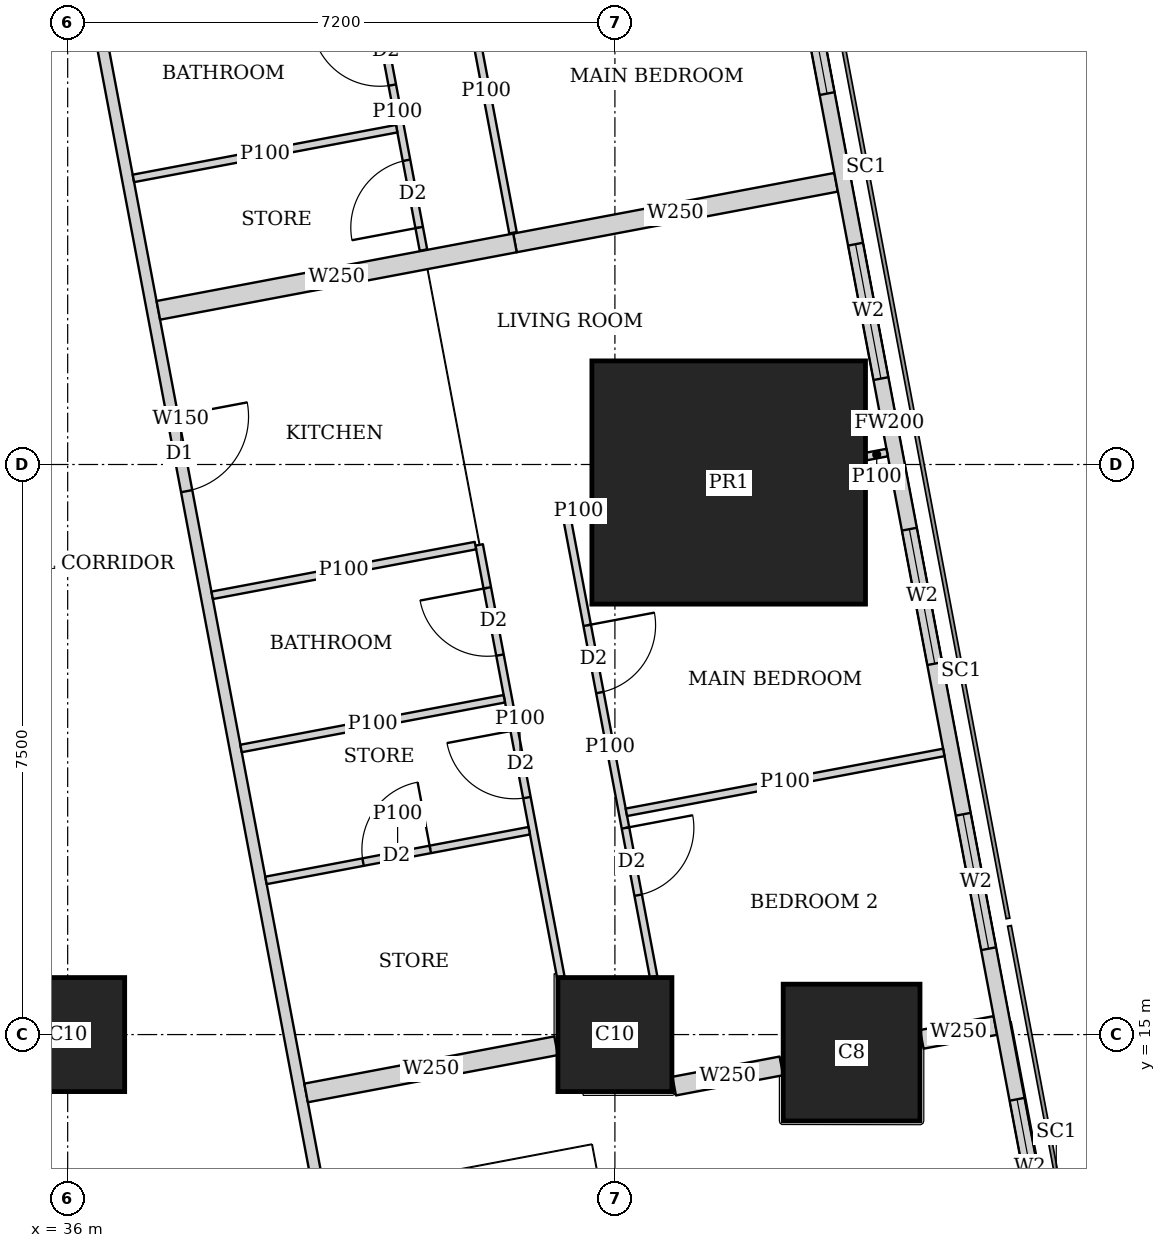
"""IFC4 building model, lengths in metres.
Left out: names, types, materials, properties, quantities, classifications, styles, units other than length and angle.
Written with IfcOpenShell. Run it as: python <this file> out.ifc"""

import sys

from ifc_helpers import new_model, si_unit, direction, frame, frame_2d, origin, origin_2d, place, context, subcontext, project, spatial, rectangle, extrude, element, fill, save


model = new_model("IFC4")
c1 = context("Model", 3, precision=1e-05, world=origin(), true_north=direction((0.0, 1.0)))
c2 = subcontext(c1, "Body", "Model", "MODEL_VIEW")
j1 = project(units=[si_unit("LENGTHUNIT", "METRE"), si_unit("PLANEANGLEUNIT", "RADIAN")], contexts=[c1])
p1 = place(None, origin())
s1 = spatial("IfcSite", under=j1, at=p1, CompositionType="ELEMENT")
p2 = place(p1, origin())
s2 = spatial("IfcBuilding", under=s1, at=p2, CompositionType="ELEMENT")
p3 = place(p2, frame((0.0, 0.0, 180.8)))
s3 = spatial("IfcBuildingStorey", under=s2, at=p3, CompositionType="ELEMENT", Elevation=180.8)
for number, where, z_axis, x_axis in (
    (1, (36.0, 15.0, 0.0), (0.0, 0.0, 1.0), (1.0, 0.0, 0.0)),
    (2, (43.2, 15.0, 0.0), (0.0, 0.0, 1.0), (1.0, 0.0, 0.0)),
):
    element("IfcColumn", number, at=place(p3, frame(where, z_axis=z_axis, x_axis=x_axis)), inside=s3, PredefinedType="COLUMN", context=c2, shape_type="SweptSolid", body=[
        extrude(rectangle(XDim=1.5, YDim=1.5, at=origin_2d()), origin(), (0.0, 0.0, 1.0), 3.75),
    ])
p4 = place(p3, frame((46.314, 14.763, 0.0), z_axis=(0.0, 0.0, 1.0), x_axis=(1.0, 0.0, 0.0)))
e3 = element("IfcColumn", 3, at=p4, inside=s3, PredefinedType="COLUMN", context=c2, shape_type="SweptSolid", body=[
    extrude(rectangle(XDim=1.8, YDim=1.8, at=origin_2d()), origin(), (0.0, 0.0, 1.0), 3.75),
])
p5 = place(p3, frame((44.697, 22.263, 0.0), z_axis=(0.0, 0.0, 1.0), x_axis=(1.0, 0.0, 0.0)))
e4 = element("IfcColumn", 4, at=p5, inside=s3, PredefinedType="COLUMN", context=c2, shape_type="SweptSolid", body=[
    extrude(rectangle(XDim=3.6, YDim=3.2, at=origin_2d()), origin(), (0.0, 0.0, 1.0), 3.75),
])
p6 = place(p3, frame((50.653, 2.703, 0.0), z_axis=(0.0, 0.0, 1.0), x_axis=(-0.185612026696, 0.982623109613, 0.0)))
e5 = element("IfcWall", 5, at=p6, inside=s3, PredefinedType="SOLIDWALL", context=c2, shape_type="SweptSolid", body=[
    extrude(rectangle(XDim=41.393, YDim=0.2, at=frame_2d((20.697, 0.0))), origin(), (0.0, 0.0, 1.0), 3.5),
])
p7 = place(p6, frame((1.633, 0.0, 0.9)))
e6 = element("IfcOpeningElement", 6, at=p7, cuts=e5, PredefinedType="OPENING", context=c2, shape_type="SweptSolid", body=[
    extrude(rectangle(XDim=1.8, YDim=1.5, at=frame_2d((0.9, 0.75))), frame((0.0, 0.11, 0.0), z_axis=(0.0, -1.0, 0.0), x_axis=(1.0, 0.0, 0.0)), (0.0, 0.0, 1.0), 0.22),
])
p8 = place(p6, frame((6.032, 0.0, 0.9)))
e7 = element("IfcOpeningElement", 7, at=p8, cuts=e5, PredefinedType="OPENING", context=c2, shape_type="SweptSolid", body=[
    extrude(rectangle(XDim=1.8, YDim=1.5, at=frame_2d((0.9, 0.75))), frame((0.0, 0.11, 0.0), z_axis=(0.0, -1.0, 0.0), x_axis=(1.0, 0.0, 0.0)), (0.0, 0.0, 1.0), 0.22),
])
p9 = place(p6, frame((9.848, 0.0, 0.9)))
e8 = element("IfcOpeningElement", 8, at=p9, cuts=e5, PredefinedType="OPENING", context=c2, shape_type="SweptSolid", body=[
    extrude(rectangle(XDim=1.8, YDim=1.5, at=frame_2d((0.9, 0.75))), frame((0.0, 0.11, 0.0), z_axis=(0.0, -1.0, 0.0), x_axis=(1.0, 0.0, 0.0)), (0.0, 0.0, 1.0), 0.22),
])
p10 = place(p6, frame((13.664, 0.0, 0.9)))
e9 = element("IfcOpeningElement", 9, at=p10, cuts=e5, PredefinedType="OPENING", context=c2, shape_type="SweptSolid", body=[
    extrude(rectangle(XDim=1.8, YDim=1.5, at=frame_2d((0.9, 0.75))), frame((0.0, 0.11, 0.0), z_axis=(0.0, -1.0, 0.0), x_axis=(1.0, 0.0, 0.0)), (0.0, 0.0, 1.0), 0.22),
])
p11 = place(p6, frame((17.481, 0.0, 0.9)))
e10 = element("IfcOpeningElement", 10, at=p11, cuts=e5, PredefinedType="OPENING", context=c2, shape_type="SweptSolid", body=[
    extrude(rectangle(XDim=1.8, YDim=1.5, at=frame_2d((0.9, 0.75))), frame((0.0, 0.11, 0.0), z_axis=(0.0, -1.0, 0.0), x_axis=(1.0, 0.0, 0.0)), (0.0, 0.0, 1.0), 0.22),
])
p12 = place(p6, frame((21.297, 0.0, 0.9)))
e11 = element("IfcOpeningElement", 11, at=p12, cuts=e5, PredefinedType="OPENING", context=c2, shape_type="SweptSolid", body=[
    extrude(rectangle(XDim=1.8, YDim=1.5, at=frame_2d((0.9, 0.75))), frame((0.0, 0.11, 0.0), z_axis=(0.0, -1.0, 0.0), x_axis=(1.0, 0.0, 0.0)), (0.0, 0.0, 1.0), 0.22),
])
p13 = place(p6, frame((25.113, 0.0, 0.9)))
e12 = element("IfcOpeningElement", 12, at=p13, cuts=e5, PredefinedType="OPENING", context=c2, shape_type="SweptSolid", body=[
    extrude(rectangle(XDim=1.8, YDim=1.5, at=frame_2d((0.9, 0.75))), frame((0.0, 0.11, 0.0), z_axis=(0.0, -1.0, 0.0), x_axis=(1.0, 0.0, 0.0)), (0.0, 0.0, 1.0), 0.22),
])
p14 = place(p6, frame((28.93, 0.0, 0.9)))
e13 = element("IfcOpeningElement", 13, at=p14, cuts=e5, PredefinedType="OPENING", context=c2, shape_type="SweptSolid", body=[
    extrude(rectangle(XDim=1.8, YDim=1.5, at=frame_2d((0.9, 0.75))), frame((0.0, 0.11, 0.0), z_axis=(0.0, -1.0, 0.0), x_axis=(1.0, 0.0, 0.0)), (0.0, 0.0, 1.0), 0.22),
])
p15 = place(p6, frame((32.746, 0.0, 0.9)))
e14 = element("IfcOpeningElement", 14, at=p15, cuts=e5, PredefinedType="OPENING", context=c2, shape_type="SweptSolid", body=[
    extrude(rectangle(XDim=1.8, YDim=1.5, at=frame_2d((0.9, 0.75))), frame((0.0, 0.11, 0.0), z_axis=(0.0, -1.0, 0.0), x_axis=(1.0, 0.0, 0.0)), (0.0, 0.0, 1.0), 0.22),
])
p16 = place(p6, frame((36.481, 0.0, 0.9)))
e15 = element("IfcOpeningElement", 15, at=p16, cuts=e5, PredefinedType="OPENING", context=c2, shape_type="SweptSolid", body=[
    extrude(rectangle(XDim=1.8, YDim=1.5, at=frame_2d((0.9, 0.75))), frame((0.0, 0.11, 0.0), z_axis=(0.0, -1.0, 0.0), x_axis=(1.0, 0.0, 0.0)), (0.0, 0.0, 1.0), 0.22),
])
p17 = place(p3, frame((33.623, 43.022, 0.0), z_axis=(0.0, 0.0, 1.0), x_axis=(0.185596841028, -0.98262597798, 0.0)))
e16 = element("IfcWall", 16, at=p17, inside=s3, PredefinedType="SOLIDWALL", context=c2, shape_type="SweptSolid", body=[
    extrude(rectangle(XDim=41.66, YDim=0.15, at=frame_2d((20.83, 0.0))), origin(), (0.0, 0.0, 1.0), 2.5),
])
p18 = place(p17, frame((8.034, 0.0, 0.0)))
e17 = element("IfcOpeningElement", 17, at=p18, cuts=e16, PredefinedType="OPENING", context=c2, shape_type="SweptSolid", body=[
    extrude(rectangle(XDim=1.0, YDim=2.1, at=frame_2d((0.5, 1.05))), frame((0.0, 0.085, 0.0), z_axis=(0.0, -1.0, 0.0), x_axis=(1.0, 0.0, 0.0)), (0.0, 0.0, 1.0), 0.17),
])
p19 = place(p17, frame((12.611, 0.0, 0.0)))
e18 = element("IfcOpeningElement", 18, at=p19, cuts=e16, PredefinedType="OPENING", context=c2, shape_type="SweptSolid", body=[
    extrude(rectangle(XDim=1.0, YDim=2.1, at=frame_2d((0.5, 1.05))), frame((0.0, 0.085, 0.0), z_axis=(0.0, -1.0, 0.0), x_axis=(1.0, 0.0, 0.0)), (0.0, 0.0, 1.0), 0.17),
])
p20 = place(p17, frame((20.242, 0.0, 0.0)))
e19 = element("IfcOpeningElement", 19, at=p20, cuts=e16, PredefinedType="OPENING", context=c2, shape_type="SweptSolid", body=[
    extrude(rectangle(XDim=1.0, YDim=2.1, at=frame_2d((0.5, 1.05))), frame((0.0, 0.085, 0.0), z_axis=(0.0, -1.0, 0.0), x_axis=(1.0, 0.0, 0.0)), (0.0, 0.0, 1.0), 0.17),
])
p21 = place(p17, frame((31.206, 0.0, 0.0)))
e20 = element("IfcOpeningElement", 20, at=p21, cuts=e16, PredefinedType="OPENING", context=c2, shape_type="SweptSolid", body=[
    extrude(rectangle(XDim=1.0, YDim=2.1, at=frame_2d((0.5, 1.05))), frame((0.0, 0.085, 0.0), z_axis=(0.0, -1.0, 0.0), x_axis=(1.0, 0.0, 0.0)), (0.0, 0.0, 1.0), 0.17),
])
p22 = place(p3, frame((41.156, 29.273, 0.0), z_axis=(0.0, 0.0, 1.0), x_axis=(0.185474762472, -0.982649028131, 0.0)))
e21 = element("IfcWall", 21, at=p22, inside=s3, PredefinedType="PARTITIONING", context=c2, shape_type="SweptSolid", body=[
    extrude(rectangle(XDim=3.79, YDim=0.1, at=frame_2d((1.895, 0.0))), origin(), (0.0, 0.0, 1.0), 2.5),
])
p23 = place(p22, frame((0.31, 0.0, 0.0)))
e22 = element("IfcOpeningElement", 22, at=p23, cuts=e21, PredefinedType="OPENING", context=c2, shape_type="SweptSolid", body=[
    extrude(rectangle(XDim=0.9, YDim=2.1, at=frame_2d((0.45, 1.05))), frame((0.0, 0.06, 0.0), z_axis=(0.0, -1.0, 0.0), x_axis=(1.0, 0.0, 0.0)), (0.0, 0.0, 1.0), 0.12),
])
p24 = place(p3, frame((39.997, 28.942, 0.0), z_axis=(0.0, 0.0, 1.0), x_axis=(0.185580474845, -0.982629069057, 0.0)))
e23 = element("IfcWall", 23, at=p24, inside=s3, PredefinedType="PARTITIONING", context=c2, shape_type="SweptSolid", body=[
    extrude(rectangle(XDim=3.685, YDim=0.1, at=frame_2d((1.842, 0.0))), origin(), (0.0, 0.0, 1.0), 3.5),
])
p25 = place(p24, frame((0.576, 0.0, 0.0)))
e24 = element("IfcOpeningElement", 24, at=p25, cuts=e23, PredefinedType="OPENING", context=c2, shape_type="SweptSolid", body=[
    extrude(rectangle(XDim=0.9, YDim=2.1, at=frame_2d((0.45, 1.05))), frame((0.0, 0.06, 0.0), z_axis=(0.0, -1.0, 0.0), x_axis=(1.0, 0.0, 0.0)), (0.0, 0.0, 1.0), 0.12),
])
p26 = place(p24, frame((2.483, 0.0, 0.0)))
e25 = element("IfcOpeningElement", 25, at=p26, cuts=e23, PredefinedType="OPENING", context=c2, shape_type="SweptSolid", body=[
    extrude(rectangle(XDim=0.9, YDim=2.1, at=frame_2d((0.45, 1.05))), frame((0.0, 0.06, 0.0), z_axis=(0.0, -1.0, 0.0), x_axis=(1.0, 0.0, 0.0)), (0.0, 0.0, 1.0), 0.12),
])
p27 = place(p3, frame((40.329, 26.918, 0.0), z_axis=(0.0, 0.0, 1.0), x_axis=(-0.982638553676, -0.185530247748, 0.0)))
e26 = element("IfcWall", 26, at=p27, inside=s3, PredefinedType="PARTITIONING", context=c2, shape_type="SweptSolid", body=[
    extrude(rectangle(XDim=3.525, YDim=0.1, at=frame_2d((1.763, 0.0))), origin(), (0.0, 0.0, 1.0), 3.5),
])
p28 = place(p3, frame((42.566, 21.809, 0.0), z_axis=(0.0, 0.0, 1.0), x_axis=(0.185679528947, -0.982610356413, 0.0)))
e27 = element("IfcWall", 27, at=p28, inside=s3, PredefinedType="PARTITIONING", context=c2, shape_type="SweptSolid", body=[
    extrude(rectangle(XDim=6.156, YDim=0.1, at=frame_2d((3.078, 0.0))), origin(), (0.0, 0.0, 1.0), 2.5),
])
p29 = place(p28, frame((1.45, 0.0, 0.0)))
e28 = element("IfcOpeningElement", 28, at=p29, cuts=e27, PredefinedType="OPENING", context=c2, shape_type="SweptSolid", body=[
    extrude(rectangle(XDim=0.9, YDim=2.1, at=frame_2d((0.45, 1.05))), frame((0.0, 0.06, 0.0), z_axis=(0.0, -1.0, 0.0), x_axis=(1.0, 0.0, 0.0)), (0.0, 0.0, 1.0), 0.12),
])
p30 = place(p28, frame((4.163, 0.0, 0.0)))
e29 = element("IfcOpeningElement", 29, at=p30, cuts=e27, PredefinedType="OPENING", context=c2, shape_type="SweptSolid", body=[
    extrude(rectangle(XDim=0.9, YDim=2.1, at=frame_2d((0.45, 1.05))), frame((0.0, 0.06, 0.0), z_axis=(0.0, -1.0, 0.0), x_axis=(1.0, 0.0, 0.0)), (0.0, 0.0, 1.0), 0.12),
])
p31 = place(p3, frame((41.414, 21.442, 0.0), z_axis=(0.0, 0.0, 1.0), x_axis=(0.185666997732, -0.982612724299, 0.0)))
e30 = element("IfcWall", 30, at=p31, inside=s3, PredefinedType="PARTITIONING", context=c2, shape_type="SweptSolid", body=[
    extrude(rectangle(XDim=5.784, YDim=0.1, at=frame_2d((2.892, 0.0))), origin(), (0.0, 0.0, 1.0), 3.5),
])
p32 = place(p31, frame((0.575, 0.0, 0.0)))
e31 = element("IfcOpeningElement", 31, at=p32, cuts=e30, PredefinedType="OPENING", context=c2, shape_type="SweptSolid", body=[
    extrude(rectangle(XDim=0.9, YDim=2.1, at=frame_2d((0.45, 1.05))), frame((0.0, 0.06, 0.0), z_axis=(0.0, -1.0, 0.0), x_axis=(1.0, 0.0, 0.0)), (0.0, 0.0, 1.0), 0.12),
])
p33 = place(p31, frame((2.483, 0.0, 0.0)))
e32 = element("IfcOpeningElement", 32, at=p33, cuts=e30, PredefinedType="OPENING", context=c2, shape_type="SweptSolid", body=[
    extrude(rectangle(XDim=0.9, YDim=2.1, at=frame_2d((0.45, 1.05))), frame((0.0, 0.06, 0.0), z_axis=(0.0, -1.0, 0.0), x_axis=(1.0, 0.0, 0.0)), (0.0, 0.0, 1.0), 0.12),
])
p34 = place(p3, frame((46.782, 22.657, 0.0), z_axis=(0.0, 0.0, 1.0), x_axis=(-0.982574553168, -0.185868898601, 0.0)))
e33 = element("IfcWall", 33, at=p34, inside=s3, PredefinedType="PARTITIONING", context=c2, shape_type="SweptSolid", body=[
    extrude(rectangle(XDim=0.28, YDim=0.1, at=frame_2d((0.14, 0.0))), origin(), (0.0, 0.0, 1.0), 3.5),
])
p35 = place(p3, frame((42.887, 21.921, 0.0), z_axis=(0.0, 0.0, 1.0), x_axis=(-0.982274918032, -0.187445953293, 0.0)))
e34 = element("IfcWall", 34, at=p35, inside=s3, PredefinedType="PARTITIONING", context=c2, shape_type="SweptSolid", body=[
    extrude(rectangle(XDim=0.336, YDim=0.1, at=frame_2d((0.168, 0.0))), origin(), (0.0, 0.0, 1.0), 2.5),
])
p36 = place(p3, frame((47.527, 18.712, 0.0), z_axis=(0.0, 0.0, 1.0), x_axis=(-0.982665405803, -0.185387972203, 0.0)))
e35 = element("IfcWall", 35, at=p36, inside=s3, PredefinedType="PARTITIONING", context=c2, shape_type="SweptSolid", body=[
    extrude(rectangle(XDim=4.25, YDim=0.1, at=frame_2d((2.125, 0.0))), origin(), (0.0, 0.0, 1.0), 2.1),
])
p37 = place(p3, frame((41.365, 21.433, 0.0), z_axis=(0.0, 0.0, 1.0), x_axis=(-0.982638553676, -0.185530247748, 0.0)))
e36 = element("IfcWall", 36, at=p37, inside=s3, PredefinedType="PARTITIONING", context=c2, shape_type="SweptSolid", body=[
    extrude(rectangle(XDim=3.525, YDim=0.1, at=frame_2d((1.763, 0.0))), origin(), (0.0, 0.0, 1.0), 3.5),
])
p38 = place(p3, frame((42.073, 17.682, 0.0), z_axis=(0.0, 0.0, 1.0), x_axis=(-0.98265117712, -0.185463376723, 0.0)))
e37 = element("IfcWall", 37, at=p38, inside=s3, PredefinedType="PARTITIONING", context=c2, shape_type="SweptSolid", body=[
    extrude(rectangle(XDim=3.525, YDim=0.1, at=frame_2d((1.763, 0.0))), origin(), (0.0, 0.0, 1.0), 3.5),
])
p39 = place(p38, frame((1.325, 0.0, 0.0)))
e38 = element("IfcOpeningElement", 38, at=p39, cuts=e37, PredefinedType="OPENING", context=c2, shape_type="SweptSolid", body=[
    extrude(rectangle(XDim=0.9, YDim=2.1, at=frame_2d((0.45, 1.05))), frame((0.0, 0.06, 0.0), z_axis=(0.0, -1.0, 0.0), x_axis=(1.0, 0.0, 0.0)), (0.0, 0.0, 1.0), 0.12),
])
p40 = place(p3, frame((41.745, 19.418, 0.0), z_axis=(0.0, 0.0, 1.0), x_axis=(-0.982638553676, -0.185530247748, 0.0)))
e39 = element("IfcWall", 39, at=p40, inside=s3, PredefinedType="PARTITIONING", context=c2, shape_type="SweptSolid", body=[
    extrude(rectangle(XDim=3.525, YDim=0.1, at=frame_2d((1.763, 0.0))), origin(), (0.0, 0.0, 1.0), 3.5),
])
p41 = place(p3, frame((46.11, 26.213, 0.0), z_axis=(0.0, 0.0, 1.0), x_axis=(-0.982633535512, -0.185556823879, 0.0)))
e40 = element("IfcWall", 40, at=p41, inside=s3, PredefinedType="SOLIDWALL", context=c2, shape_type="SweptSolid", body=[
    extrude(rectangle(XDim=4.3, YDim=0.25, at=frame_2d((2.15, 0.0))), origin(), (0.0, 0.0, 1.0), 2.1),
])
p42 = place(p3, frame((41.885, 25.415, 0.0), z_axis=(0.0, 0.0, 1.0), x_axis=(-0.982596737686, -0.185751584349, 0.0)))
e41 = element("IfcWall", 41, at=p42, inside=s3, PredefinedType="SOLIDWALL", context=c2, shape_type="SweptSolid", body=[
    extrude(rectangle(XDim=4.775, YDim=0.25, at=frame_2d((2.387, 0.0))), origin(), (0.0, 0.0, 1.0), 3.5),
])
p43 = place(p3, frame((48.206, 15.12, 0.0), z_axis=(0.0, 0.0, 1.0), x_axis=(-0.982576361834, -0.185859337043, 0.0)))
e42 = element("IfcWall", 42, at=p43, inside=s3, PredefinedType="SOLIDWALL", context=c2, shape_type="SweptSolid", body=[
    extrude(rectangle(XDim=0.985, YDim=0.25, at=frame_2d((0.493, 0.0))), origin(), (0.0, 0.0, 1.0), 2.1),
])
p44 = place(p3, frame((45.39, 14.588, 0.0), z_axis=(0.0, 0.0, 1.0), x_axis=(-0.982680951688, -0.18530555089, 0.0)))
e43 = element("IfcWall", 43, at=p44, inside=s3, PredefinedType="SOLIDWALL", context=c2, shape_type="SweptSolid", body=[
    extrude(rectangle(XDim=1.435, YDim=0.25, at=frame_2d((0.717, 0.0))), origin(), (0.0, 0.0, 1.0), 2.1),
])
p45 = place(p3, frame((42.426, 14.853, 0.0), z_axis=(0.0, 0.0, 1.0), x_axis=(-0.982633560103, -0.185556693654, 0.0)))
e44 = element("IfcWall", 44, at=p45, inside=s3, PredefinedType="SOLIDWALL", context=c2, shape_type="SweptSolid", body=[
    extrude(rectangle(XDim=3.347, YDim=0.25, at=frame_2d((1.674, 0.0))), origin(), (0.0, 0.0, 1.0), 3.5),
])
p46 = place(p9, origin())
e45 = element("IfcWindow", 45, at=p46, inside=s3, PartitioningType="SINGLE_PANEL", PredefinedType="WINDOW", context=c2, shape_type="SweptSolid", body=[
    extrude(rectangle(XDim=1.8, YDim=1.5, at=frame_2d((0.9, 0.75))), frame((0.0, 0.03, 0.0), z_axis=(0.0, -1.0, 0.0), x_axis=(1.0, 0.0, 0.0)), (0.0, 0.0, 1.0), 0.06),
])
fill(e8, e45)
p47 = place(p10, origin())
e46 = element("IfcWindow", 46, at=p47, inside=s3, PartitioningType="SINGLE_PANEL", PredefinedType="WINDOW", context=c2, shape_type="SweptSolid", body=[
    extrude(rectangle(XDim=1.8, YDim=1.5, at=frame_2d((0.9, 0.75))), frame((0.0, 0.03, 0.0), z_axis=(0.0, -1.0, 0.0), x_axis=(1.0, 0.0, 0.0)), (0.0, 0.0, 1.0), 0.06),
])
fill(e9, e46)
p48 = place(p11, origin())
e47 = element("IfcWindow", 47, at=p48, inside=s3, PartitioningType="SINGLE_PANEL", PredefinedType="WINDOW", context=c2, shape_type="SweptSolid", body=[
    extrude(rectangle(XDim=1.8, YDim=1.5, at=frame_2d((0.9, 0.75))), frame((0.0, 0.03, 0.0), z_axis=(0.0, -1.0, 0.0), x_axis=(1.0, 0.0, 0.0)), (0.0, 0.0, 1.0), 0.06),
])
fill(e10, e47)
p49 = place(p12, origin())
e48 = element("IfcWindow", 48, at=p49, inside=s3, PartitioningType="SINGLE_PANEL", PredefinedType="WINDOW", context=c2, shape_type="SweptSolid", body=[
    extrude(rectangle(XDim=1.8, YDim=1.5, at=frame_2d((0.9, 0.75))), frame((0.0, 0.03, 0.0), z_axis=(0.0, -1.0, 0.0), x_axis=(1.0, 0.0, 0.0)), (0.0, 0.0, 1.0), 0.06),
])
fill(e11, e48)
p50 = place(p13, origin())
e49 = element("IfcWindow", 49, at=p50, inside=s3, PartitioningType="SINGLE_PANEL", PredefinedType="WINDOW", context=c2, shape_type="SweptSolid", body=[
    extrude(rectangle(XDim=1.8, YDim=1.5, at=frame_2d((0.9, 0.75))), frame((0.0, 0.03, 0.0), z_axis=(0.0, -1.0, 0.0), x_axis=(1.0, 0.0, 0.0)), (0.0, 0.0, 1.0), 0.06),
])
fill(e12, e49)
p51 = place(p25, origin())
e50 = element("IfcDoor", 50, at=p51, inside=s3, OperationType="SINGLE_SWING_RIGHT", PredefinedType="DOOR", context=c2, shape_type="SweptSolid", body=[
    extrude(rectangle(XDim=0.9, YDim=2.1, at=frame_2d((0.45, 1.05))), frame((0.0, 0.025, 0.0), z_axis=(0.0, -1.0, 0.0), x_axis=(1.0, 0.0, 0.0)), (0.0, 0.0, 1.0), 0.05),
])
fill(e24, e50)
p52 = place(p26, origin())
e51 = element("IfcDoor", 51, at=p52, inside=s3, OperationType="SINGLE_SWING_LEFT", PredefinedType="DOOR", context=c2, shape_type="SweptSolid", body=[
    extrude(rectangle(XDim=0.9, YDim=2.1, at=frame_2d((0.45, 1.05))), frame((0.0, 0.025, 0.0), z_axis=(0.0, -1.0, 0.0), x_axis=(1.0, 0.0, 0.0)), (0.0, 0.0, 1.0), 0.05),
])
fill(e25, e51)
p53 = place(p29, origin())
e52 = element("IfcDoor", 52, at=p53, inside=s3, OperationType="SINGLE_SWING_LEFT", PredefinedType="DOOR", context=c2, shape_type="SweptSolid", body=[
    extrude(rectangle(XDim=0.9, YDim=2.1, at=frame_2d((0.45, 1.05))), frame((0.0, 0.025, 0.0), z_axis=(0.0, -1.0, 0.0), x_axis=(1.0, 0.0, 0.0)), (0.0, 0.0, 1.0), 0.05),
])
fill(e28, e52)
p54 = place(p30, origin())
e53 = element("IfcDoor", 53, at=p54, inside=s3, OperationType="SINGLE_SWING_LEFT", PredefinedType="DOOR", context=c2, shape_type="SweptSolid", body=[
    extrude(rectangle(XDim=0.9, YDim=2.1, at=frame_2d((0.45, 1.05))), frame((0.0, 0.025, 0.0), z_axis=(0.0, -1.0, 0.0), x_axis=(1.0, 0.0, 0.0)), (0.0, 0.0, 1.0), 0.05),
])
fill(e29, e53)
p55 = place(p32, origin())
e54 = element("IfcDoor", 54, at=p55, inside=s3, OperationType="SINGLE_SWING_RIGHT", PredefinedType="DOOR", context=c2, shape_type="SweptSolid", body=[
    extrude(rectangle(XDim=0.9, YDim=2.1, at=frame_2d((0.45, 1.05))), frame((0.0, 0.025, 0.0), z_axis=(0.0, -1.0, 0.0), x_axis=(1.0, 0.0, 0.0)), (0.0, 0.0, 1.0), 0.05),
])
fill(e31, e54)
p56 = place(p33, origin())
e55 = element("IfcDoor", 55, at=p56, inside=s3, OperationType="SINGLE_SWING_RIGHT", PredefinedType="DOOR", context=c2, shape_type="SweptSolid", body=[
    extrude(rectangle(XDim=0.9, YDim=2.1, at=frame_2d((0.45, 1.05))), frame((0.0, 0.025, 0.0), z_axis=(0.0, -1.0, 0.0), x_axis=(1.0, 0.0, 0.0)), (0.0, 0.0, 1.0), 0.05),
])
fill(e32, e55)
p57 = place(p20, origin())
e56 = element("IfcDoor", 56, at=p57, inside=s3, OperationType="SINGLE_SWING_LEFT", PredefinedType="DOOR", context=c2, shape_type="SweptSolid", body=[
    extrude(rectangle(XDim=1.0, YDim=2.1, at=frame_2d((0.5, 1.05))), frame((0.0, 0.025, 0.0), z_axis=(0.0, -1.0, 0.0), x_axis=(1.0, 0.0, 0.0)), (0.0, 0.0, 1.0), 0.05),
])
fill(e19, e56)
p58 = place(p39, origin())
e57 = element("IfcDoor", 57, at=p58, inside=s3, OperationType="SINGLE_SWING_RIGHT", PredefinedType="DOOR", context=c2, shape_type="SweptSolid", body=[
    extrude(rectangle(XDim=0.9, YDim=2.1, at=frame_2d((0.45, 1.05))), frame((0.0, 0.025, 0.0), z_axis=(0.0, -1.0, 0.0), x_axis=(1.0, 0.0, 0.0)), (0.0, 0.0, 1.0), 0.05),
])
fill(e38, e57)
save(model, sys.argv[1])
